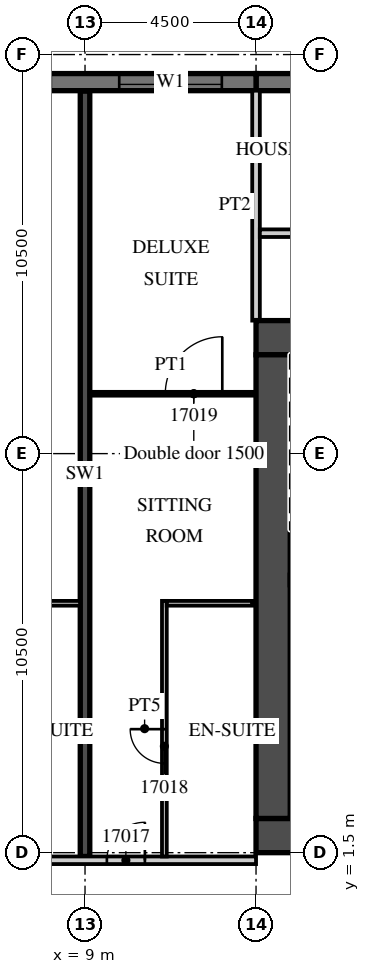
"""IFC4 building model, lengths in metres.
Left out: names, types, materials, properties, quantities, classifications, styles, units other than length and angle.
Written with IfcOpenShell. Run it as: python <this file> out.ifc"""

import sys

from ifc_helpers import new_model, si_unit, direction, frame, frame_2d, origin, place, context, subcontext, project, spatial, rectangle, extrude, element, fill, save


model = new_model("IFC4")
c1 = context("Model", 3, precision=1e-05, world=origin(), true_north=direction((0.0, 1.0)))
c2 = subcontext(c1, "Body", "Model", "MODEL_VIEW")
j1 = project(units=[si_unit("LENGTHUNIT", "METRE"), si_unit("PLANEANGLEUNIT", "RADIAN")], contexts=[c1])
p1 = place(None, origin())
s1 = spatial("IfcSite", under=j1, at=p1, CompositionType="ELEMENT")
p2 = place(p1, origin())
s2 = spatial("IfcBuilding", under=s1, at=p2, CompositionType="ELEMENT")
p3 = place(p2, frame((0.0, 0.0, 86.4)))
s3 = spatial("IfcBuildingStorey", under=s2, at=p3, CompositionType="ELEMENT", Elevation=86.4)
p4 = place(p3, frame((9.0, 1.4, 0.0), z_axis=(0.0, 0.0, 1.0), x_axis=(0.0, 1.0, 0.0)))
e1 = element("IfcWall", 1, at=p4, inside=s3, PredefinedType="SHEAR", context=c2, shape_type="SweptSolid", body=[
    extrude(rectangle(XDim=20.14, YDim=0.25, at=frame_2d((10.07, 0.0))), origin(), (0.0, 0.0, 1.0), 3.3),
])
p5 = place(p3, frame((31.5, 21.775, 0.0), z_axis=(0.0, 0.0, 1.0), x_axis=(-1.0, 0.0, 0.0)))
e2 = element("IfcWall", 2, at=p5, inside=s3, PredefinedType="SOLIDWALL", context=c2, shape_type="SweptSolid", body=[
    extrude(rectangle(XDim=18.0, YDim=0.45, at=frame_2d((9.0, 0.0))), origin(), (0.0, 0.0, 1.0), 3.02),
])
p6 = place(p3, frame((13.5, 21.775, 0.0), z_axis=(0.0, 0.0, 1.0), x_axis=(-1.0, 0.0, 0.0)))
e3 = element("IfcWall", 3, at=p6, inside=s3, PredefinedType="SOLIDWALL", context=c2, shape_type="SweptSolid", body=[
    extrude(rectangle(XDim=54.5, YDim=0.45, at=frame_2d((27.25, 0.0))), origin(), (0.0, 0.0, 1.0), 3.02),
])
p7 = place(p6, frame((0.9, 0.0, 0.45)))
e4 = element("IfcOpeningElement", 4, at=p7, cuts=e3, PredefinedType="OPENING", context=c2, shape_type="SweptSolid", body=[
    extrude(rectangle(XDim=2.7, YDim=2.25, at=frame_2d((1.35, 1.125))), frame((0.0, 0.235, 0.0), z_axis=(0.0, -1.0, 0.0), x_axis=(1.0, 0.0, 0.0)), (0.0, 0.0, 1.0), 0.47),
])
p8 = place(p6, frame((5.4, 0.0, 0.45)))
e5 = element("IfcOpeningElement", 5, at=p8, cuts=e3, PredefinedType="OPENING", context=c2, shape_type="SweptSolid", body=[
    extrude(rectangle(XDim=2.7, YDim=2.25, at=frame_2d((1.35, 1.125))), frame((0.0, 0.235, 0.0), z_axis=(0.0, -1.0, 0.0), x_axis=(1.0, 0.0, 0.0)), (0.0, 0.0, 1.0), 0.47),
])
p9 = place(p6, frame((9.9, 0.0, 0.45)))
e6 = element("IfcOpeningElement", 6, at=p9, cuts=e3, PredefinedType="OPENING", context=c2, shape_type="SweptSolid", body=[
    extrude(rectangle(XDim=2.7, YDim=2.25, at=frame_2d((1.35, 1.125))), frame((0.0, 0.235, 0.0), z_axis=(0.0, -1.0, 0.0), x_axis=(1.0, 0.0, 0.0)), (0.0, 0.0, 1.0), 0.47),
])
p10 = place(p6, frame((14.4, 0.0, 0.45)))
e7 = element("IfcOpeningElement", 7, at=p10, cuts=e3, PredefinedType="OPENING", context=c2, shape_type="SweptSolid", body=[
    extrude(rectangle(XDim=2.7, YDim=2.25, at=frame_2d((1.35, 1.125))), frame((0.0, 0.235, 0.0), z_axis=(0.0, -1.0, 0.0), x_axis=(1.0, 0.0, 0.0)), (0.0, 0.0, 1.0), 0.47),
])
p11 = place(p6, frame((18.9, 0.0, 0.45)))
e8 = element("IfcOpeningElement", 8, at=p11, cuts=e3, PredefinedType="OPENING", context=c2, shape_type="SweptSolid", body=[
    extrude(rectangle(XDim=2.7, YDim=2.25, at=frame_2d((1.35, 1.125))), frame((0.0, 0.235, 0.0), z_axis=(0.0, -1.0, 0.0), x_axis=(1.0, 0.0, 0.0)), (0.0, 0.0, 1.0), 0.47),
])
p12 = place(p6, frame((23.4, 0.0, 0.45)))
e9 = element("IfcOpeningElement", 9, at=p12, cuts=e3, PredefinedType="OPENING", context=c2, shape_type="SweptSolid", body=[
    extrude(rectangle(XDim=2.7, YDim=2.25, at=frame_2d((1.35, 1.125))), frame((0.0, 0.235, 0.0), z_axis=(0.0, -1.0, 0.0), x_axis=(1.0, 0.0, 0.0)), (0.0, 0.0, 1.0), 0.47),
])
p13 = place(p6, frame((27.9, 0.0, 0.45)))
e10 = element("IfcOpeningElement", 10, at=p13, cuts=e3, PredefinedType="OPENING", context=c2, shape_type="SweptSolid", body=[
    extrude(rectangle(XDim=2.7, YDim=2.25, at=frame_2d((1.35, 1.125))), frame((0.0, 0.235, 0.0), z_axis=(0.0, -1.0, 0.0), x_axis=(1.0, 0.0, 0.0)), (0.0, 0.0, 1.0), 0.47),
])
p14 = place(p6, frame((32.4, 0.0, 0.45)))
e11 = element("IfcOpeningElement", 11, at=p14, cuts=e3, PredefinedType="OPENING", context=c2, shape_type="SweptSolid", body=[
    extrude(rectangle(XDim=2.7, YDim=2.25, at=frame_2d((1.35, 1.125))), frame((0.0, 0.235, 0.0), z_axis=(0.0, -1.0, 0.0), x_axis=(1.0, 0.0, 0.0)), (0.0, 0.0, 1.0), 0.47),
])
p15 = place(p6, frame((36.9, 0.0, 0.45)))
e12 = element("IfcOpeningElement", 12, at=p15, cuts=e3, PredefinedType="OPENING", context=c2, shape_type="SweptSolid", body=[
    extrude(rectangle(XDim=2.7, YDim=2.25, at=frame_2d((1.35, 1.125))), frame((0.0, 0.235, 0.0), z_axis=(0.0, -1.0, 0.0), x_axis=(1.0, 0.0, 0.0)), (0.0, 0.0, 1.0), 0.47),
])
p16 = place(p6, frame((41.4, 0.0, 0.45)))
e13 = element("IfcOpeningElement", 13, at=p16, cuts=e3, PredefinedType="OPENING", context=c2, shape_type="SweptSolid", body=[
    extrude(rectangle(XDim=2.7, YDim=2.25, at=frame_2d((1.35, 1.125))), frame((0.0, 0.235, 0.0), z_axis=(0.0, -1.0, 0.0), x_axis=(1.0, 0.0, 0.0)), (0.0, 0.0, 1.0), 0.47),
])
p17 = place(p6, frame((45.9, 0.0, 0.45)))
e14 = element("IfcOpeningElement", 14, at=p17, cuts=e3, PredefinedType="OPENING", context=c2, shape_type="SweptSolid", body=[
    extrude(rectangle(XDim=2.7, YDim=2.25, at=frame_2d((1.35, 1.125))), frame((0.0, 0.235, 0.0), z_axis=(0.0, -1.0, 0.0), x_axis=(1.0, 0.0, 0.0)), (0.0, 0.0, 1.0), 0.47),
])
p18 = place(p6, frame((50.4, 0.0, 0.45)))
e15 = element("IfcOpeningElement", 15, at=p18, cuts=e3, PredefinedType="OPENING", context=c2, shape_type="SweptSolid", body=[
    extrude(rectangle(XDim=2.7, YDim=2.25, at=frame_2d((1.35, 1.125))), frame((0.0, 0.235, 0.0), z_axis=(0.0, -1.0, 0.0), x_axis=(1.0, 0.0, 0.0)), (0.0, 0.0, 1.0), 0.47),
])
p19 = place(p3, frame((13.5, 15.5, 0.0), z_axis=(0.0, 0.0, 1.0), x_axis=(0.0, 1.0, 0.0)))
e16 = element("IfcWall", 16, at=p19, inside=s3, PredefinedType="PARTITIONING", context=c2, shape_type="SweptSolid", body=[
    extrude(rectangle(XDim=6.05, YDim=0.2, at=frame_2d((3.025, 0.0))), origin(), (0.0, 0.0, 1.0), 3.02),
])
p20 = place(p3, frame((-44.55, 1.3, 0.0), z_axis=(0.0, 0.0, 1.0), x_axis=(1.0, 0.0, 0.0)))
e17 = element("IfcWall", 17, at=p20, inside=s3, PredefinedType="PARTITIONING", context=c2, shape_type="SweptSolid", body=[
    extrude(rectangle(XDim=58.05, YDim=0.2, at=frame_2d((29.025, 0.0))), origin(), (0.0, 0.0, 1.0), 3.02),
])
p21 = place(p20, frame((0.525, 0.0, 0.0)))
e18 = element("IfcOpeningElement", 18, at=p21, cuts=e17, PredefinedType="OPENING", context=c2, shape_type="SweptSolid", body=[
    extrude(rectangle(XDim=1.0, YDim=2.1, at=frame_2d((0.5, 1.05))), frame((0.0, 0.11, 0.0), z_axis=(0.0, -1.0, 0.0), x_axis=(1.0, 0.0, 0.0)), (0.0, 0.0, 1.0), 0.22),
])
p22 = place(p20, frame((6.975, 0.0, 0.0)))
e19 = element("IfcOpeningElement", 19, at=p22, cuts=e17, PredefinedType="OPENING", context=c2, shape_type="SweptSolid", body=[
    extrude(rectangle(XDim=1.0, YDim=2.1, at=frame_2d((0.5, 1.05))), frame((0.0, 0.11, 0.0), z_axis=(0.0, -1.0, 0.0), x_axis=(1.0, 0.0, 0.0)), (0.0, 0.0, 1.0), 0.22),
])
p23 = place(p20, frame((11.5, 0.0, 0.0)))
e20 = element("IfcOpeningElement", 20, at=p23, cuts=e17, PredefinedType="OPENING", context=c2, shape_type="SweptSolid", body=[
    extrude(rectangle(XDim=1.0, YDim=2.1, at=frame_2d((0.5, 1.05))), frame((0.0, 0.11, 0.0), z_axis=(0.0, -1.0, 0.0), x_axis=(1.0, 0.0, 0.0)), (0.0, 0.0, 1.0), 0.22),
])
p24 = place(p20, frame((13.6, 0.0, 0.0)))
e21 = element("IfcOpeningElement", 21, at=p24, cuts=e17, PredefinedType="OPENING", context=c2, shape_type="SweptSolid", body=[
    extrude(rectangle(XDim=1.0, YDim=2.1, at=frame_2d((0.5, 1.05))), frame((0.0, 0.11, 0.0), z_axis=(0.0, -1.0, 0.0), x_axis=(1.0, 0.0, 0.0)), (0.0, 0.0, 1.0), 0.22),
])
p25 = place(p20, frame((22.912, 0.0, 0.0)))
e22 = element("IfcOpeningElement", 22, at=p25, cuts=e17, PredefinedType="OPENING", context=c2, shape_type="SweptSolid", body=[
    extrude(rectangle(XDim=1.2, YDim=2.1, at=frame_2d((0.6, 1.05))), frame((0.0, 0.11, 0.0), z_axis=(0.0, -1.0, 0.0), x_axis=(1.0, 0.0, 0.0)), (0.0, 0.0, 1.0), 0.22),
])
p26 = place(p20, frame((31.912, 0.0, 0.0)))
e23 = element("IfcOpeningElement", 23, at=p26, cuts=e17, PredefinedType="OPENING", context=c2, shape_type="SweptSolid", body=[
    extrude(rectangle(XDim=1.2, YDim=2.1, at=frame_2d((0.6, 1.05))), frame((0.0, 0.11, 0.0), z_axis=(0.0, -1.0, 0.0), x_axis=(1.0, 0.0, 0.0)), (0.0, 0.0, 1.0), 0.22),
])
p27 = place(p20, frame((37.987, 0.0, 0.0)))
e24 = element("IfcOpeningElement", 24, at=p27, cuts=e17, PredefinedType="OPENING", context=c2, shape_type="SweptSolid", body=[
    extrude(rectangle(XDim=1.2, YDim=2.1, at=frame_2d((0.6, 1.05))), frame((0.0, 0.11, 0.0), z_axis=(0.0, -1.0, 0.0), x_axis=(1.0, 0.0, 0.0)), (0.0, 0.0, 1.0), 0.22),
])
p28 = place(p20, frame((46.987, 0.0, 0.0)))
e25 = element("IfcOpeningElement", 25, at=p28, cuts=e17, PredefinedType="OPENING", context=c2, shape_type="SweptSolid", body=[
    extrude(rectangle(XDim=1.2, YDim=2.1, at=frame_2d((0.6, 1.05))), frame((0.0, 0.11, 0.0), z_axis=(0.0, -1.0, 0.0), x_axis=(1.0, 0.0, 0.0)), (0.0, 0.0, 1.0), 0.22),
])
p29 = place(p20, frame((54.125, 0.0, 0.0)))
e26 = element("IfcOpeningElement", 26, at=p29, cuts=e17, PredefinedType="OPENING", context=c2, shape_type="SweptSolid", body=[
    extrude(rectangle(XDim=1.0, YDim=2.1, at=frame_2d((0.5, 1.05))), frame((0.0, 0.11, 0.0), z_axis=(0.0, -1.0, 0.0), x_axis=(1.0, 0.0, 0.0)), (0.0, 0.0, 1.0), 0.22),
])
p30 = place(p3, frame((6.075, 8.062, 0.0), z_axis=(0.0, 0.0, 1.0), x_axis=(1.0, 0.0, 0.0)))
e27 = element("IfcWall", 27, at=p30, inside=s3, PredefinedType="PARTITIONING", context=c2, shape_type="SweptSolid", body=[
    extrude(rectangle(XDim=2.8, YDim=0.125, at=frame_2d((1.4, 0.0))), origin(), (0.0, 0.0, 1.0), 3.02),
])
p31 = place(p3, frame((11.088, 1.4, 0.0), z_axis=(0.0, 0.0, 1.0), x_axis=(0.0, 1.0, 0.0)))
e28 = element("IfcWall", 28, at=p31, inside=s3, PredefinedType="PARTITIONING", context=c2, shape_type="SweptSolid", body=[
    extrude(rectangle(XDim=6.725, YDim=0.125, at=frame_2d((3.363, 0.0))), origin(), (0.0, 0.0, 1.0), 3.02),
])
p32 = place(p31, frame((2.45, 0.0, 0.0)))
e29 = element("IfcOpeningElement", 29, at=p32, cuts=e28, PredefinedType="OPENING", context=c2, shape_type="SweptSolid", body=[
    extrude(rectangle(XDim=0.9, YDim=2.1, at=frame_2d((0.45, 1.05))), frame((0.0, 0.073, 0.0), z_axis=(0.0, -1.0, 0.0), x_axis=(1.0, 0.0, 0.0)), (0.0, 0.0, 1.0), 0.145),
])
p33 = place(p3, frame((11.15, 8.062, 0.0), z_axis=(0.0, 0.0, 1.0), x_axis=(1.0, 0.0, 0.0)))
e30 = element("IfcWall", 30, at=p33, inside=s3, PredefinedType="PARTITIONING", context=c2, shape_type="SweptSolid", body=[
    extrude(rectangle(XDim=2.25, YDim=0.125, at=frame_2d((1.125, 0.0))), origin(), (0.0, 0.0, 1.0), 3.02),
])
p34 = place(p3, frame((9.125, 13.575, 0.0), z_axis=(0.0, 0.0, 1.0), x_axis=(1.0, 0.0, 0.0)))
e31 = element("IfcWall", 31, at=p34, inside=s3, PredefinedType="PARTITIONING", context=c2, shape_type="SweptSolid", body=[
    extrude(rectangle(XDim=4.275, YDim=0.1, at=frame_2d((2.137, 0.0))), origin(), (0.0, 0.0, 1.0), 3.02),
])
p35 = place(p34, frame((1.987, 0.0, 0.0)))
e32 = element("IfcOpeningElement", 32, at=p35, cuts=e31, PredefinedType="OPENING", context=c2, shape_type="SweptSolid", body=[
    extrude(rectangle(XDim=1.5, YDim=2.1, at=frame_2d((0.75, 1.05))), frame((0.0, 0.06, 0.0), z_axis=(0.0, -1.0, 0.0), x_axis=(1.0, 0.0, 0.0)), (0.0, 0.0, 1.0), 0.12),
])
p36 = place(p3, frame((13.5, 1.95, 0.0), z_axis=(0.0, 0.0, 1.0), x_axis=(1.0, 0.0, 0.0)))
e33 = element("IfcWall", 33, at=p36, inside=s3, PredefinedType="SHEAR", context=c2, shape_type="SweptSolid", body=[
    extrude(rectangle(XDim=18.0, YDim=0.9, at=frame_2d((9.0, 0.0))), origin(), (0.0, 0.0, 1.0), 3.02),
])
p37 = place(p36, frame((1.475, 0.0, 0.0)))
e34 = element("IfcOpeningElement", 34, at=p37, cuts=e33, PredefinedType="OPENING", context=c2, shape_type="SweptSolid", body=[
    extrude(rectangle(XDim=1.8, YDim=2.1, at=frame_2d((0.9, 1.05))), frame((0.0, 0.46, 0.0), z_axis=(0.0, -1.0, 0.0), x_axis=(1.0, 0.0, 0.0)), (0.0, 0.0, 1.0), 0.92),
])
p38 = place(p3, frame((13.5, 15.05, 0.0), z_axis=(0.0, 0.0, 1.0), x_axis=(1.0, 0.0, 0.0)))
e35 = element("IfcWall", 35, at=p38, inside=s3, PredefinedType="SHEAR", context=c2, shape_type="SweptSolid", body=[
    extrude(rectangle(XDim=6.8, YDim=0.9, at=frame_2d((3.4, 0.0))), origin(), (0.0, 0.0, 1.0), 3.02),
])
p39 = place(p38, frame((4.725, 0.0, 0.0)))
e36 = element("IfcOpeningElement", 36, at=p39, cuts=e35, PredefinedType="OPENING", context=c2, shape_type="SweptSolid", body=[
    extrude(rectangle(XDim=1.2, YDim=2.1, at=frame_2d((0.6, 1.05))), frame((0.0, 0.46, 0.0), z_axis=(0.0, -1.0, 0.0), x_axis=(1.0, 0.0, 0.0)), (0.0, 0.0, 1.0), 0.92),
])
p40 = place(p3, frame((13.95, 2.4, 0.0), z_axis=(0.0, 0.0, 1.0), x_axis=(0.0, 1.0, 0.0)))
e37 = element("IfcWall", 37, at=p40, inside=s3, PredefinedType="SHEAR", context=c2, shape_type="SweptSolid", body=[
    extrude(rectangle(XDim=12.2, YDim=0.9, at=frame_2d((6.1, 0.0))), origin(), (0.0, 0.0, 1.0), 3.02),
])
p41 = place(p3, frame((13.6, 17.8, 0.0), z_axis=(0.0, 0.0, 1.0), x_axis=(1.0, 0.0, 0.0)))
e38 = element("IfcWall", 38, at=p41, inside=s3, PredefinedType="PARTITIONING", context=c2, shape_type="SweptSolid", body=[
    extrude(rectangle(XDim=30.95, YDim=0.2, at=frame_2d((15.475, 0.0))), origin(), (0.0, 0.0, 1.0), 3.02),
])
p42 = place(p41, frame((17.812, 0.0, 0.0)))
e39 = element("IfcOpeningElement", 39, at=p42, cuts=e38, PredefinedType="OPENING", context=c2, shape_type="SweptSolid", body=[
    extrude(rectangle(XDim=0.9, YDim=2.1, at=frame_2d((0.45, 1.05))), frame((0.0, 0.11, 0.0), z_axis=(0.0, -1.0, 0.0), x_axis=(1.0, 0.0, 0.0)), (0.0, 0.0, 1.0), 0.22),
])
p43 = place(p41, frame((9.512, 0.0, 0.0)))
e40 = element("IfcOpeningElement", 40, at=p43, cuts=e38, PredefinedType="OPENING", context=c2, shape_type="SweptSolid", body=[
    extrude(rectangle(XDim=0.9, YDim=2.1, at=frame_2d((0.45, 1.05))), frame((0.0, 0.11, 0.0), z_axis=(0.0, -1.0, 0.0), x_axis=(1.0, 0.0, 0.0)), (0.0, 0.0, 1.0), 0.22),
])
p44 = place(p7, origin())
e41 = element("IfcWindow", 41, at=p44, inside=s3, PartitioningType="SINGLE_PANEL", PredefinedType="WINDOW", context=c2, shape_type="SweptSolid", body=[
    extrude(rectangle(XDim=2.7, YDim=2.25, at=frame_2d((1.35, 1.125))), frame((0.0, 0.09, 0.0), z_axis=(0.0, -1.0, 0.0), x_axis=(1.0, 0.0, 0.0)), (0.0, 0.0, 1.0), 0.06),
])
fill(e4, e41)
p45 = place(p29, origin())
e42 = element("IfcDoor", 42, at=p45, inside=s3, OperationType="SINGLE_SWING_RIGHT", PredefinedType="DOOR", context=c2, shape_type="SweptSolid", body=[
    extrude(rectangle(XDim=1.0, YDim=2.1, at=frame_2d((0.5, 1.05))), frame((0.0, 0.025, 0.0), z_axis=(0.0, -1.0, 0.0), x_axis=(1.0, 0.0, 0.0)), (0.0, 0.0, 1.0), 0.05),
])
fill(e26, e42)
p46 = place(p32, origin())
e43 = element("IfcDoor", 43, at=p46, inside=s3, OperationType="SINGLE_SWING_RIGHT", PredefinedType="DOOR", context=c2, shape_type="SweptSolid", body=[
    extrude(rectangle(XDim=0.9, YDim=2.1, at=frame_2d((0.45, 1.05))), frame((0.0, 0.025, 0.0), z_axis=(0.0, -1.0, 0.0), x_axis=(1.0, 0.0, 0.0)), (0.0, 0.0, 1.0), 0.05),
])
fill(e29, e43)
p47 = place(p35, origin())
e44 = element("IfcDoor", 44, at=p47, inside=s3, OperationType="SINGLE_SWING_RIGHT", PredefinedType="DOOR", context=c2, shape_type="SweptSolid", body=[
    extrude(rectangle(XDim=1.5, YDim=2.1, at=frame_2d((0.75, 1.05))), frame((0.0, 0.025, 0.0), z_axis=(0.0, -1.0, 0.0), x_axis=(1.0, 0.0, 0.0)), (0.0, 0.0, 1.0), 0.05),
])
fill(e32, e44)
save(model, sys.argv[1])
